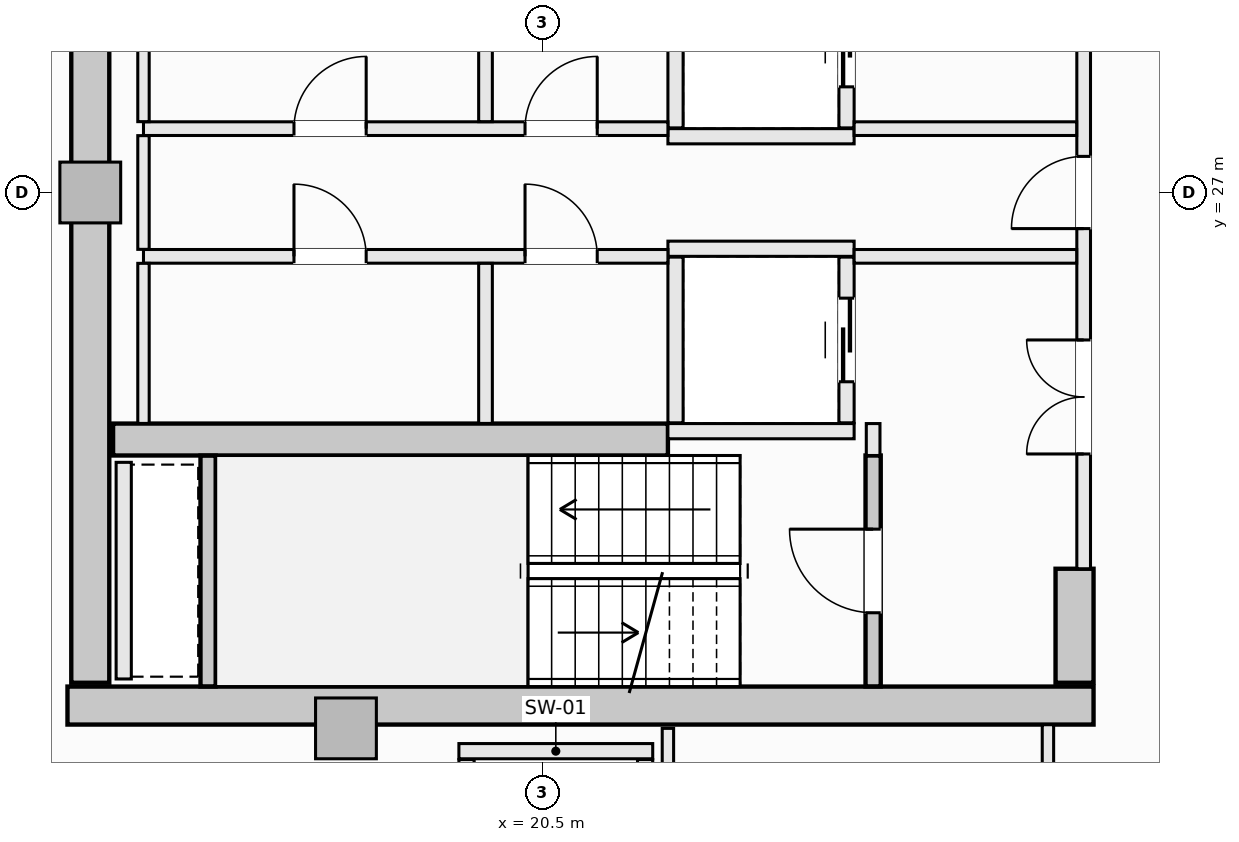
"""IFC4 building model, lengths in metres.
Left out: names, types, materials, properties, quantities, classifications, styles, units other than length and angle.
Written with IfcOpenShell. Run it as: python <this file> out.ifc"""

import sys

from ifc_helpers import new_model, si_unit, direction, frame, frame_2d, origin, origin_2d, place, context, subcontext, project, spatial, rectangle, extrude, element, fill, save


model = new_model("IFC4")
c1 = context("Model", 3, precision=1e-05, world=origin(), true_north=direction((0.0, 1.0)))
c2 = subcontext(c1, "Body", "Model", "MODEL_VIEW")
j1 = project(units=[si_unit("LENGTHUNIT", "METRE"), si_unit("PLANEANGLEUNIT", "RADIAN")], contexts=[c1])
p1 = place(None, origin())
s1 = spatial("IfcSite", under=j1, at=p1, CompositionType="ELEMENT")
p2 = place(p1, origin())
s2 = spatial("IfcBuilding", under=s1, at=p2, CompositionType="ELEMENT")
p3 = place(p2, frame((0.0, 0.0, 265.7)))
s3 = spatial("IfcBuildingStorey", under=s2, at=p3, CompositionType="ELEMENT", Elevation=265.7)
p4 = place(p3, frame((14.25, 20.25, -0.27), z_axis=(0.0, 0.0, 1.0), x_axis=(1.0, 0.0, 0.0)))
e1 = element("IfcWall", 1, at=p4, inside=s3, PredefinedType="SHEAR", context=c2, shape_type="SweptSolid", body=[
    extrude(rectangle(XDim=13.5, YDim=0.5, at=frame_2d((6.75, 0.0))), origin(), (0.0, 0.0, 1.0), 3.3),
])
p5 = place(p3, frame((14.55, 20.55, -0.27), z_axis=(0.0, 0.0, 1.0), x_axis=(0.0, 1.0, 0.0)))
e2 = element("IfcWall", 2, at=p5, inside=s3, PredefinedType="SHEAR", context=c2, shape_type="SweptSolid", body=[
    extrude(rectangle(XDim=12.9, YDim=0.5, at=frame_2d((6.45, 0.0))), origin(), (0.0, 0.0, 1.0), 3.3),
])
p6 = place(p3, frame((27.5, 20.55, -0.27), z_axis=(0.0, 0.0, 1.0), x_axis=(0.0, 1.0, 0.0)))
e3 = element("IfcWall", 3, at=p6, inside=s3, PredefinedType="SHEAR", context=c2, shape_type="SweptSolid", body=[
    extrude(rectangle(XDim=1.5, YDim=0.5, at=frame_2d((0.75, 0.0))), origin(), (0.0, 0.0, 1.0), 3.3),
])
p7 = place(p3, frame((14.85, 23.75, -0.27), z_axis=(0.0, 0.0, 1.0), x_axis=(1.0, 0.0, 0.0)))
e4 = element("IfcWall", 4, at=p7, inside=s3, PredefinedType="SHEAR", context=c2, shape_type="SweptSolid", body=[
    extrude(rectangle(XDim=7.3, YDim=0.42, at=frame_2d((3.65, 0.0))), origin(), (0.0, 0.0, 1.0), 3.3),
])
for number, where, z_axis, x_axis in (
    (5, (14.55, 27.0, -0.27), (0.0, 0.0, 1.0), (1.0, 0.0, 0.0)),
    (6, (17.914, 19.95, -0.27), (0.0, 0.0, 1.0), (1.0, 0.0, 0.0)),
):
    element("IfcColumn", number, at=place(p3, frame(where, z_axis=z_axis, x_axis=x_axis)), inside=s3, PredefinedType="PILASTER", context=c2, shape_type="SweptSolid", body=[
        extrude(rectangle(XDim=0.8, YDim=0.8, at=origin_2d()), origin(), (0.0, 0.0, 1.0), 3.3),
    ])
p8 = place(p3, frame((24.85, 20.502, -0.27), z_axis=(0.0, 0.0, 1.0), x_axis=(0.0, 1.0, 0.0)))
e7 = element("IfcWall", 7, at=p8, inside=s3, PredefinedType="SHEAR", context=c2, shape_type="SweptSolid", body=[
    extrude(rectangle(XDim=3.038, YDim=0.2, at=frame_2d((1.519, 0.0))), origin(), (0.0, 0.0, 1.0), 3.3),
])
p9 = place(p8, frame((0.969, 0.0, 0.27)))
e8 = element("IfcOpeningElement", 8, at=p9, cuts=e7, PredefinedType="OPENING", context=c2, shape_type="SweptSolid", body=[
    extrude(rectangle(XDim=1.1, YDim=2.15, at=frame_2d((0.55, 1.075))), frame((0.0, 0.11, 0.0), z_axis=(0.0, -1.0, 0.0), x_axis=(1.0, 0.0, 0.0)), (0.0, 0.0, 1.0), 0.22),
])
p10 = place(p3, frame((16.1, 20.502, -0.27), z_axis=(0.0, 0.0, 1.0), x_axis=(0.0, 1.0, 0.0)))
e9 = element("IfcWall", 9, at=p10, inside=s3, PredefinedType="SHEAR", context=c2, shape_type="SweptSolid", body=[
    extrude(rectangle(XDim=3.036, YDim=0.2, at=frame_2d((1.518, 0.0))), origin(), (0.0, 0.0, 1.0), 3.3),
])
p11 = place(p3, frame((22.15, 27.74, 0.0), z_axis=(0.0, 0.0, 1.0), x_axis=(1.0, 0.0, 0.0)))
e10 = element("IfcWall", 10, at=p11, inside=s3, PredefinedType="SOLIDWALL", context=c2, shape_type="SweptSolid", body=[
    extrude(rectangle(XDim=2.45, YDim=0.2, at=frame_2d((1.225, 0.0))), origin(), (0.0, 0.0, 1.0), 3.03),
])
p12 = place(p3, frame((22.25, 27.85, 0.0), z_axis=(0.0, 0.0, 1.0), x_axis=(0.0, 1.0, 0.0)))
e11 = element("IfcWall", 11, at=p12, inside=s3, PredefinedType="SOLIDWALL", context=c2, shape_type="SweptSolid", body=[
    extrude(rectangle(XDim=2.18, YDim=0.2, at=frame_2d((1.09, 0.0))), origin(), (0.0, 0.0, 1.0), 3.03),
])
p13 = place(p3, frame((24.5, 27.85, 0.0), z_axis=(0.0, 0.0, 1.0), x_axis=(0.0, 1.0, 0.0)))
e12 = element("IfcWall", 12, at=p13, inside=s3, PredefinedType="SOLIDWALL", context=c2, shape_type="SweptSolid", body=[
    extrude(rectangle(XDim=2.18, YDim=0.2, at=frame_2d((1.09, 0.0))), origin(), (0.0, 0.0, 1.0), 3.03),
])
p14 = place(p13, frame((0.54, 0.0, 0.0)))
e13 = element("IfcOpeningElement", 13, at=p14, cuts=e12, PredefinedType="OPENING", context=c2, shape_type="SweptSolid", body=[
    extrude(rectangle(XDim=1.1, YDim=2.2, at=frame_2d((0.55, 1.1))), frame((0.0, 0.11, 0.0), z_axis=(0.0, -1.0, 0.0), x_axis=(1.0, 0.0, 0.0)), (0.0, 0.0, 1.0), 0.22),
])
for number, where, z_axis, x_axis in (
    (14, (22.15, 26.26, 0.0), (0.0, 0.0, 1.0), (1.0, 0.0, 0.0)),
    (15, (22.15, 23.86, 0.0), (0.0, 0.0, 1.0), (1.0, 0.0, 0.0)),
):
    element("IfcWall", number, at=place(p3, frame(where, z_axis=z_axis, x_axis=x_axis)), inside=s3, PredefinedType="SOLIDWALL", context=c2, shape_type="SweptSolid", body=[
        extrude(rectangle(XDim=2.45, YDim=0.2, at=frame_2d((1.225, 0.0))), origin(), (0.0, 0.0, 1.0), 3.03),
    ])
p15 = place(p3, frame((22.25, 23.97, 0.0), z_axis=(0.0, 0.0, 1.0), x_axis=(0.0, 1.0, 0.0)))
e16 = element("IfcWall", 16, at=p15, inside=s3, PredefinedType="SOLIDWALL", context=c2, shape_type="SweptSolid", body=[
    extrude(rectangle(XDim=2.18, YDim=0.2, at=frame_2d((1.09, 0.0))), origin(), (0.0, 0.0, 1.0), 3.03),
])
p16 = place(p3, frame((24.5, 23.97, 0.0), z_axis=(0.0, 0.0, 1.0), x_axis=(0.0, 1.0, 0.0)))
e17 = element("IfcWall", 17, at=p16, inside=s3, PredefinedType="SOLIDWALL", context=c2, shape_type="SweptSolid", body=[
    extrude(rectangle(XDim=2.18, YDim=0.2, at=frame_2d((1.09, 0.0))), origin(), (0.0, 0.0, 1.0), 3.03),
])
p17 = place(p16, frame((0.54, 0.0, 0.0)))
e18 = element("IfcOpeningElement", 18, at=p17, cuts=e17, PredefinedType="OPENING", context=c2, shape_type="SweptSolid", body=[
    extrude(rectangle(XDim=1.1, YDim=2.2, at=frame_2d((0.55, 1.1))), frame((0.0, 0.11, 0.0), z_axis=(0.0, -1.0, 0.0), x_axis=(1.0, 0.0, 0.0)), (0.0, 0.0, 1.0), 0.22),
])
p18 = place(p3, frame((19.4, 19.65, 0.0), z_axis=(0.0, 0.0, 1.0), x_axis=(1.0, 0.0, 0.0)))
e19 = element("IfcWall", 19, at=p18, inside=s3, PredefinedType="SOLIDWALL", context=c2, shape_type="SweptSolid", body=[
    extrude(rectangle(XDim=2.55, YDim=0.2, at=frame_2d((1.275, 0.0))), origin(), (0.0, 0.0, 1.0), 3.03),
])
for number, where, z_axis, x_axis in (
    (20, (19.5, 17.01, 0.0), (0.0, 0.0, 1.0), (0.0, 1.0, 0.0)),
    (21, (21.85, 17.01, 0.0), (0.0, 0.0, 1.0), (0.0, 1.0, 0.0)),
):
    element("IfcWall", number, at=place(p3, frame(where, z_axis=z_axis, x_axis=x_axis)), inside=s3, PredefinedType="SOLIDWALL", context=c2, shape_type="SweptSolid", body=[
        extrude(rectangle(XDim=2.53, YDim=0.2, at=frame_2d((1.265, 0.0))), origin(), (0.0, 0.0, 1.0), 3.03),
    ])
p19 = place(p3, frame((14.99, 20.6, 0.0), z_axis=(0.0, 0.0, 1.0), x_axis=(0.0, 1.0, 0.0)))
e22 = element("IfcWall", 22, at=p19, inside=s3, PredefinedType="SOLIDWALL", context=c2, shape_type="SweptSolid", body=[
    extrude(rectangle(XDim=2.85, YDim=0.2, at=frame_2d((1.425, 0.0))), origin(), (0.0, 0.0, 1.0), 3.03),
])
p20 = place(p3, frame((24.85, 23.54, 0.0), z_axis=(0.0, 0.0, 1.0), x_axis=(0.0, 1.0, 0.0)))
e23 = element("IfcWall", 23, at=p20, inside=s3, PredefinedType="SOLIDWALL", context=c2, shape_type="SweptSolid", body=[
    extrude(rectangle(XDim=0.42, YDim=0.18, at=frame_2d((0.21, 0.0))), origin(), (0.0, 0.0, 1.0), 3.03),
])
p21 = place(p3, frame((27.62, 22.05, 0.0), z_axis=(0.0, 0.0, 1.0), x_axis=(0.0, 1.0, 0.0)))
e24 = element("IfcWall", 24, at=p21, inside=s3, PredefinedType="SOLIDWALL", context=c2, shape_type="SweptSolid", body=[
    extrude(rectangle(XDim=9.9, YDim=0.18, at=frame_2d((4.95, 0.0))), origin(), (0.0, 0.0, 1.0), 3.03),
])
p22 = place(p21, frame((4.475, 0.0, 0.0)))
e25 = element("IfcOpeningElement", 25, at=p22, cuts=e24, PredefinedType="OPENING", context=c2, shape_type="SweptSolid", body=[
    extrude(rectangle(XDim=0.95, YDim=2.1, at=frame_2d((0.475, 1.05))), frame((0.0, 0.1, 0.0), z_axis=(0.0, -1.0, 0.0), x_axis=(1.0, 0.0, 0.0)), (0.0, 0.0, 1.0), 0.2),
])
p23 = place(p21, frame((6.89, 0.0, 0.0)))
e26 = element("IfcOpeningElement", 26, at=p23, cuts=e24, PredefinedType="OPENING", context=c2, shape_type="SweptSolid", body=[
    extrude(rectangle(XDim=1.5, YDim=2.2, at=frame_2d((0.75, 1.1))), frame((0.0, 0.1, 0.0), z_axis=(0.0, -1.0, 0.0), x_axis=(1.0, 0.0, 0.0)), (0.0, 0.0, 1.0), 0.2),
])
p24 = place(p21, frame((1.51, 0.0, 0.0)))
e27 = element("IfcOpeningElement", 27, at=p24, cuts=e24, PredefinedType="OPENING", context=c2, shape_type="SweptSolid", body=[
    extrude(rectangle(XDim=1.5, YDim=2.2, at=frame_2d((0.75, 1.1))), frame((0.0, 0.1, 0.0), z_axis=(0.0, -1.0, 0.0), x_axis=(1.0, 0.0, 0.0)), (0.0, 0.0, 1.0), 0.2),
])
p25 = place(p3, frame((15.25, 27.84, 0.0), z_axis=(0.0, 0.0, 1.0), x_axis=(1.0, 0.0, 0.0)))
e28 = element("IfcWall", 28, at=p25, inside=s3, PredefinedType="SOLIDWALL", context=c2, shape_type="SweptSolid", body=[
    extrude(rectangle(XDim=6.9, YDim=0.18, at=frame_2d((3.45, 0.0))), origin(), (0.0, 0.0, 1.0), 3.03),
])
p26 = place(p25, frame((5.02, 0.0, 0.0)))
e29 = element("IfcOpeningElement", 29, at=p26, cuts=e28, PredefinedType="OPENING", context=c2, shape_type="SweptSolid", body=[
    extrude(rectangle(XDim=0.95, YDim=2.1, at=frame_2d((0.475, 1.05))), frame((0.0, 0.1, 0.0), z_axis=(0.0, -1.0, 0.0), x_axis=(1.0, 0.0, 0.0)), (0.0, 0.0, 1.0), 0.2),
])
p27 = place(p25, frame((1.98, 0.0, 0.0)))
e30 = element("IfcOpeningElement", 30, at=p27, cuts=e28, PredefinedType="OPENING", context=c2, shape_type="SweptSolid", body=[
    extrude(rectangle(XDim=0.95, YDim=2.1, at=frame_2d((0.475, 1.05))), frame((0.0, 0.1, 0.0), z_axis=(0.0, -1.0, 0.0), x_axis=(1.0, 0.0, 0.0)), (0.0, 0.0, 1.0), 0.2),
])
p28 = place(p3, frame((24.6, 27.84, 0.0), z_axis=(0.0, 0.0, 1.0), x_axis=(1.0, 0.0, 0.0)))
e31 = element("IfcWall", 31, at=p28, inside=s3, PredefinedType="SOLIDWALL", context=c2, shape_type="SweptSolid", body=[
    extrude(rectangle(XDim=2.928, YDim=0.18, at=frame_2d((1.464, 0.0))), origin(), (0.0, 0.0, 1.0), 3.03),
])
p29 = place(p3, frame((15.25, 26.16, 0.0), z_axis=(0.0, 0.0, 1.0), x_axis=(1.0, 0.0, 0.0)))
e32 = element("IfcWall", 32, at=p29, inside=s3, PredefinedType="SOLIDWALL", context=c2, shape_type="SweptSolid", body=[
    extrude(rectangle(XDim=6.9, YDim=0.18, at=frame_2d((3.45, 0.0))), origin(), (0.0, 0.0, 1.0), 3.03),
])
p30 = place(p29, frame((5.02, 0.0, 0.0)))
e33 = element("IfcOpeningElement", 33, at=p30, cuts=e32, PredefinedType="OPENING", context=c2, shape_type="SweptSolid", body=[
    extrude(rectangle(XDim=0.95, YDim=2.1, at=frame_2d((0.475, 1.05))), frame((0.0, 0.1, 0.0), z_axis=(0.0, -1.0, 0.0), x_axis=(1.0, 0.0, 0.0)), (0.0, 0.0, 1.0), 0.2),
])
p31 = place(p29, frame((1.98, 0.0, 0.0)))
e34 = element("IfcOpeningElement", 34, at=p31, cuts=e32, PredefinedType="OPENING", context=c2, shape_type="SweptSolid", body=[
    extrude(rectangle(XDim=0.95, YDim=2.1, at=frame_2d((0.475, 1.05))), frame((0.0, 0.1, 0.0), z_axis=(0.0, -1.0, 0.0), x_axis=(1.0, 0.0, 0.0)), (0.0, 0.0, 1.0), 0.2),
])
p32 = place(p3, frame((24.6, 26.16, 0.0), z_axis=(0.0, 0.0, 1.0), x_axis=(1.0, 0.0, 0.0)))
e35 = element("IfcWall", 35, at=p32, inside=s3, PredefinedType="SOLIDWALL", context=c2, shape_type="SweptSolid", body=[
    extrude(rectangle(XDim=2.928, YDim=0.18, at=frame_2d((1.464, 0.0))), origin(), (0.0, 0.0, 1.0), 3.03),
])
p33 = place(p3, frame((15.25, 23.962, 0.0), z_axis=(0.0, 0.0, 1.0), x_axis=(0.0, 1.0, 0.0)))
e36 = element("IfcWall", 36, at=p33, inside=s3, PredefinedType="PARTITIONING", context=c2, shape_type="SweptSolid", body=[
    extrude(rectangle(XDim=2.106, YDim=0.15, at=frame_2d((1.053, 0.0))), origin(), (0.0, 0.0, 1.0), 3.03),
])
p34 = place(p3, frame((15.25, 26.252, 0.0), z_axis=(0.0, 0.0, 1.0), x_axis=(0.0, 1.0, 0.0)))
e37 = element("IfcWall", 37, at=p34, inside=s3, PredefinedType="PARTITIONING", context=c2, shape_type="SweptSolid", body=[
    extrude(rectangle(XDim=1.496, YDim=0.15, at=frame_2d((0.748, 0.0))), origin(), (0.0, 0.0, 1.0), 3.03),
])
p35 = place(p3, frame((15.25, 27.932, 0.0), z_axis=(0.0, 0.0, 1.0), x_axis=(0.0, 1.0, 0.0)))
e38 = element("IfcWall", 38, at=p35, inside=s3, PredefinedType="PARTITIONING", context=c2, shape_type="SweptSolid", body=[
    extrude(rectangle(XDim=2.106, YDim=0.15, at=frame_2d((1.053, 0.0))), origin(), (0.0, 0.0, 1.0), 3.03),
])
for number, where, z_axis, x_axis in (
    (39, (19.75, 23.962, 0.0), (0.0, 0.0, 1.0), (0.0, 1.0, 0.0)),
    (40, (19.75, 27.932, 0.0), (0.0, 0.0, 1.0), (0.0, 1.0, 0.0)),
):
    element("IfcWall", number, at=place(p3, frame(where, z_axis=z_axis, x_axis=x_axis)), inside=s3, PredefinedType="SOLIDWALL", context=c2, shape_type="SweptSolid", body=[
        extrude(rectangle(XDim=2.106, YDim=0.18, at=frame_2d((1.053, 0.0))), origin(), (0.0, 0.0, 1.0), 3.03),
    ])
p36 = place(p3, frame((22.15, 17.127, 0.0), z_axis=(0.0, 0.0, 1.0), x_axis=(0.0, 1.0, 0.0)))
e41 = element("IfcWall", 41, at=p36, inside=s3, PredefinedType="PARTITIONING", context=c2, shape_type="SweptSolid", body=[
    extrude(rectangle(XDim=2.823, YDim=0.15, at=frame_2d((1.412, 0.0))), origin(), (0.0, 0.0, 1.0), 3.03),
])
p37 = place(p3, frame((27.15, 17.127, 0.0), z_axis=(0.0, 0.0, 1.0), x_axis=(0.0, 1.0, 0.0)))
e42 = element("IfcWall", 42, at=p37, inside=s3, PredefinedType="PARTITIONING", context=c2, shape_type="SweptSolid", body=[
    extrude(rectangle(XDim=2.871, YDim=0.15, at=frame_2d((1.436, 0.0))), origin(), (0.0, 0.0, 1.0), 3.03),
])
p38 = place(p37, frame((0.96, 0.0, 0.0)))
e43 = element("IfcOpeningElement", 43, at=p38, cuts=e42, PredefinedType="OPENING", context=c2, shape_type="SweptSolid", body=[
    extrude(rectangle(XDim=0.95, YDim=2.1, at=frame_2d((0.475, 1.05))), frame((0.0, 0.085, 0.0), z_axis=(0.0, -1.0, 0.0), x_axis=(1.0, 0.0, 0.0)), (0.0, 0.0, 1.0), 0.17),
])
p39 = place(p9, origin())
e44 = element("IfcDoor", 44, at=p39, inside=s3, OperationType="SINGLE_SWING_RIGHT", PredefinedType="DOOR", context=c2, shape_type="SweptSolid", body=[
    extrude(rectangle(XDim=1.1, YDim=2.15, at=frame_2d((0.55, 1.075))), frame((0.0, 0.025, 0.0), z_axis=(0.0, -1.0, 0.0), x_axis=(1.0, 0.0, 0.0)), (0.0, 0.0, 1.0), 0.05),
])
fill(e8, e44)
p40 = place(p14, origin())
e45 = element("IfcDoor", 45, at=p40, inside=s3, OperationType="SLIDING_TO_LEFT", PredefinedType="DOOR", context=c2, shape_type="SweptSolid", body=[
    extrude(rectangle(XDim=1.1, YDim=2.2, at=frame_2d((0.55, 1.1))), frame((0.0, 0.025, 0.0), z_axis=(0.0, -1.0, 0.0), x_axis=(1.0, 0.0, 0.0)), (0.0, 0.0, 1.0), 0.05),
])
fill(e13, e45)
p41 = place(p17, origin())
e46 = element("IfcDoor", 46, at=p41, inside=s3, OperationType="SLIDING_TO_LEFT", PredefinedType="DOOR", context=c2, shape_type="SweptSolid", body=[
    extrude(rectangle(XDim=1.1, YDim=2.2, at=frame_2d((0.55, 1.1))), frame((0.0, 0.025, 0.0), z_axis=(0.0, -1.0, 0.0), x_axis=(1.0, 0.0, 0.0)), (0.0, 0.0, 1.0), 0.05),
])
fill(e18, e46)
p42 = place(p22, origin())
e47 = element("IfcDoor", 47, at=p42, inside=s3, OperationType="SINGLE_SWING_LEFT", PredefinedType="DOOR", context=c2, shape_type="SweptSolid", body=[
    extrude(rectangle(XDim=0.95, YDim=2.1, at=frame_2d((0.475, 1.05))), frame((0.0, 0.025, 0.0), z_axis=(0.0, -1.0, 0.0), x_axis=(1.0, 0.0, 0.0)), (0.0, 0.0, 1.0), 0.05),
])
fill(e25, e47)
p43 = place(p24, origin())
e48 = element("IfcDoor", 48, at=p43, inside=s3, OperationType="DOUBLE_DOOR_SINGLE_SWING", PredefinedType="DOOR", context=c2, shape_type="SweptSolid", body=[
    extrude(rectangle(XDim=1.5, YDim=2.2, at=frame_2d((0.75, 1.1))), frame((0.0, 0.025, 0.0), z_axis=(0.0, -1.0, 0.0), x_axis=(1.0, 0.0, 0.0)), (0.0, 0.0, 1.0), 0.05),
])
fill(e27, e48)
p44 = place(p26, origin())
e49 = element("IfcDoor", 49, at=p44, inside=s3, OperationType="SINGLE_SWING_RIGHT", PredefinedType="DOOR", context=c2, shape_type="SweptSolid", body=[
    extrude(rectangle(XDim=0.95, YDim=2.1, at=frame_2d((0.475, 1.05))), frame((0.0, 0.025, 0.0), z_axis=(0.0, -1.0, 0.0), x_axis=(1.0, 0.0, 0.0)), (0.0, 0.0, 1.0), 0.05),
])
fill(e29, e49)
p45 = place(p30, origin())
e50 = element("IfcDoor", 50, at=p45, inside=s3, OperationType="SINGLE_SWING_LEFT", PredefinedType="DOOR", context=c2, shape_type="SweptSolid", body=[
    extrude(rectangle(XDim=0.95, YDim=2.1, at=frame_2d((0.475, 1.05))), frame((0.0, 0.025, 0.0), z_axis=(0.0, -1.0, 0.0), x_axis=(1.0, 0.0, 0.0)), (0.0, 0.0, 1.0), 0.05),
])
fill(e33, e50)
p46 = place(p27, origin())
e51 = element("IfcDoor", 51, at=p46, inside=s3, OperationType="SINGLE_SWING_RIGHT", PredefinedType="DOOR", context=c2, shape_type="SweptSolid", body=[
    extrude(rectangle(XDim=0.95, YDim=2.1, at=frame_2d((0.475, 1.05))), frame((0.0, 0.025, 0.0), z_axis=(0.0, -1.0, 0.0), x_axis=(1.0, 0.0, 0.0)), (0.0, 0.0, 1.0), 0.05),
])
fill(e30, e51)
p47 = place(p31, origin())
e52 = element("IfcDoor", 52, at=p47, inside=s3, OperationType="SINGLE_SWING_LEFT", PredefinedType="DOOR", context=c2, shape_type="SweptSolid", body=[
    extrude(rectangle(XDim=0.95, YDim=2.1, at=frame_2d((0.475, 1.05))), frame((0.0, 0.025, 0.0), z_axis=(0.0, -1.0, 0.0), x_axis=(1.0, 0.0, 0.0)), (0.0, 0.0, 1.0), 0.05),
])
fill(e34, e52)
save(model, sys.argv[1])
